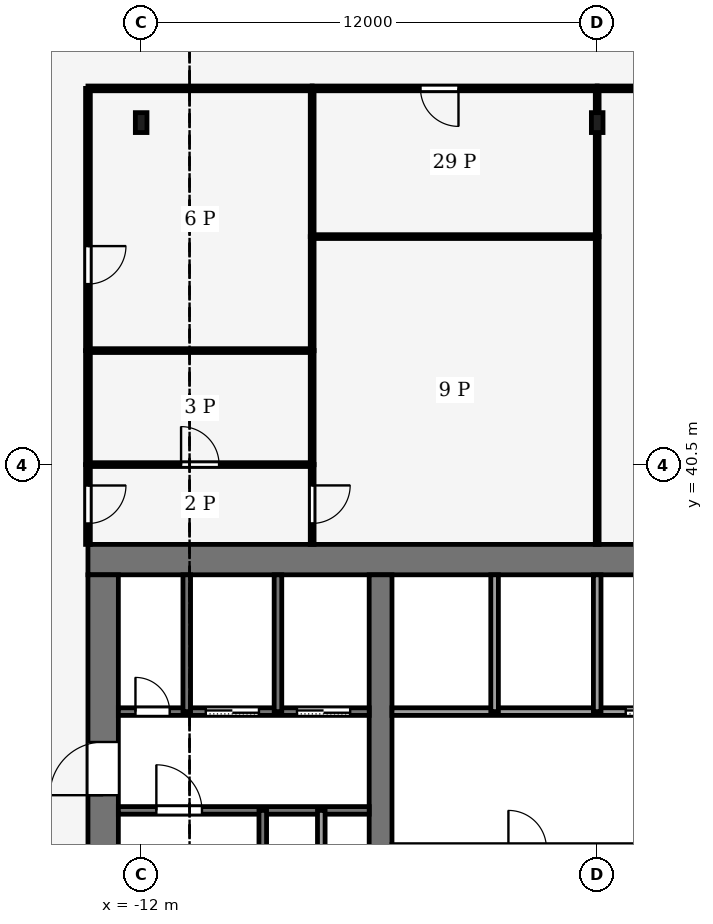
"""IFC4 building model, lengths in metres.
Left out: names, types, materials, properties, quantities, classifications, styles, units other than length and angle.
Written with IfcOpenShell. Run it as: python <this file> out.ifc"""

import sys

from ifc_helpers import new_model, si_unit, direction, frame, frame_2d, origin, origin_2d, place, context, subcontext, project, spatial, rectangle, i_section, extrude, element, fill, save


model = new_model("IFC4")
c1 = context("Model", 3, precision=1e-05, world=origin(), true_north=direction((0.0, 1.0)))
c2 = subcontext(c1, "Body", "Model", "MODEL_VIEW")
j1 = project(units=[si_unit("LENGTHUNIT", "METRE"), si_unit("PLANEANGLEUNIT", "RADIAN")], contexts=[c1])
p1 = place(None, origin())
s1 = spatial("IfcSite", under=j1, at=p1, CompositionType="ELEMENT")
p2 = place(p1, origin())
s2 = spatial("IfcBuilding", under=s1, at=p2, CompositionType="ELEMENT")
p3 = place(p2, frame((0.0, 0.0, 258.0)))
s3 = spatial("IfcBuildingStorey", under=s2, at=p3, CompositionType="ELEMENT", Elevation=258.0)
p4 = place(p3, frame((-13.4, 38.0, -0.13), z_axis=(0.0, 0.0, 1.0), x_axis=(1.0, 0.0, 0.0)))
e1 = element("IfcWall", 1, at=p4, inside=s3, PredefinedType="SHEAR", context=c2, shape_type="SweptSolid", body=[
    extrude(rectangle(XDim=26.8, YDim=0.8, at=frame_2d((13.4, 0.0))), origin(), (0.0, 0.0, 1.0), 4.0),
])
p5 = place(p3, frame((-13.0, 18.4, -0.13), z_axis=(0.0, 0.0, 1.0), x_axis=(0.0, 1.0, 0.0)))
e2 = element("IfcWall", 2, at=p5, inside=s3, PredefinedType="SHEAR", context=c2, shape_type="SweptSolid", body=[
    extrude(rectangle(XDim=19.2, YDim=0.8, at=frame_2d((9.6, 0.0))), origin(), (0.0, 0.0, 1.0), 4.0),
])
p6 = place(p5, frame((2.8, 0.0, 0.13)))
e3 = element("IfcOpeningElement", 3, at=p6, cuts=e2, PredefinedType="OPENING", context=c2, shape_type="SweptSolid", body=[
    extrude(rectangle(XDim=2.4, YDim=2.4, at=frame_2d((1.2, 1.2))), frame((0.0, 0.41, 0.0), z_axis=(0.0, -1.0, 0.0), x_axis=(1.0, 0.0, 0.0)), (0.0, 0.0, 1.0), 0.82),
])
p7 = place(p5, frame((13.4, 0.0, 0.13)))
e4 = element("IfcOpeningElement", 4, at=p7, cuts=e2, PredefinedType="OPENING", context=c2, shape_type="SweptSolid", body=[
    extrude(rectangle(XDim=1.4, YDim=2.2, at=frame_2d((0.7, 1.1))), frame((0.0, 0.41, 0.0), z_axis=(0.0, -1.0, 0.0), x_axis=(1.0, 0.0, 0.0)), (0.0, 0.0, 1.0), 0.82),
])
p8 = place(p3, frame((-5.7, 18.4, -0.13), z_axis=(0.0, 0.0, 1.0), x_axis=(0.0, 1.0, 0.0)))
e5 = element("IfcWall", 5, at=p8, inside=s3, PredefinedType="SHEAR", context=c2, shape_type="SweptSolid", body=[
    extrude(rectangle(XDim=19.2, YDim=0.6, at=frame_2d((9.6, 0.0))), origin(), (0.0, 0.0, 1.0), 4.0),
])
p9 = place(p8, frame((8.35, 0.0, 0.13)))
e6 = element("IfcOpeningElement", 6, at=p9, cuts=e5, PredefinedType="OPENING", context=c2, shape_type="SweptSolid", body=[
    extrude(rectangle(XDim=0.9, YDim=2.1, at=frame_2d((0.45, 1.05))), frame((0.0, 0.31, 0.0), z_axis=(0.0, -1.0, 0.0), x_axis=(1.0, 0.0, 0.0)), (0.0, 0.0, 1.0), 0.62),
])
for number, where, z_axis, x_axis in (
    (7, (-12.0, 49.5, 0.0), (0.0, 0.0, 1.0), (1.0, 0.0, 0.0)),
    (8, (0.0, 49.5, 0.0), (0.0, 0.0, 1.0), (1.0, 0.0, 0.0)),
):
    element("IfcColumn", number, at=place(p3, frame(where, z_axis=z_axis, x_axis=x_axis)), inside=s3, PredefinedType="COLUMN", context=c2, shape_type="SweptSolid", body=[
        extrude(i_section(OverallWidth=0.306, OverallDepth=0.524, WebThickness=0.012, FlangeThickness=0.04, FilletRadius=0.027, at=origin_2d()), origin(), (0.0, 0.0, 1.0), 4.0),
    ])
p10 = place(p3, frame((-12.6, 31.4, 0.0), z_axis=(0.0, 0.0, 1.0), x_axis=(1.0, 0.0, 0.0)))
e9 = element("IfcWall", 9, at=p10, inside=s3, PredefinedType="PARTITIONING", context=c2, shape_type="SweptSolid", body=[
    extrude(rectangle(XDim=6.6, YDim=0.2, at=frame_2d((3.3, 0.0))), origin(), (0.0, 0.0, 1.0), 3.87),
])
p11 = place(p10, frame((1.0, 0.0, 0.0)))
e10 = element("IfcOpeningElement", 10, at=p11, cuts=e9, PredefinedType="OPENING", context=c2, shape_type="SweptSolid", body=[
    extrude(rectangle(XDim=1.2, YDim=2.2, at=frame_2d((0.6, 1.1))), frame((0.0, 0.11, 0.0), z_axis=(0.0, -1.0, 0.0), x_axis=(1.0, 0.0, 0.0)), (0.0, 0.0, 1.0), 0.22),
])
p12 = place(p3, frame((-12.6, 34.0, 0.0), z_axis=(0.0, 0.0, 1.0), x_axis=(1.0, 0.0, 0.0)))
e11 = element("IfcWall", 11, at=p12, inside=s3, PredefinedType="PARTITIONING", context=c2, shape_type="SweptSolid", body=[
    extrude(rectangle(XDim=6.6, YDim=0.2, at=frame_2d((3.3, 0.0))), origin(), (0.0, 0.0, 1.0), 3.87),
])
p13 = place(p12, frame((4.7, 0.0, 0.0)))
e12 = element("IfcOpeningElement", 12, at=p13, cuts=e11, PredefinedType="OPENING", context=c2, shape_type="SweptSolid", body=[
    extrude(rectangle(XDim=1.4, YDim=2.2, at=frame_2d((0.7, 1.1))), frame((0.0, 0.11, 0.0), z_axis=(0.0, -1.0, 0.0), x_axis=(1.0, 0.0, 0.0)), (0.0, 0.0, 1.0), 0.22),
])
p14 = place(p12, frame((2.3, 0.0, 0.0)))
e13 = element("IfcOpeningElement", 13, at=p14, cuts=e11, PredefinedType="OPENING", context=c2, shape_type="SweptSolid", body=[
    extrude(rectangle(XDim=1.4, YDim=2.2, at=frame_2d((0.7, 1.1))), frame((0.0, 0.11, 0.0), z_axis=(0.0, -1.0, 0.0), x_axis=(1.0, 0.0, 0.0)), (0.0, 0.0, 1.0), 0.22),
])
p15 = place(p12, frame((0.45, 0.0, 0.0)))
e14 = element("IfcOpeningElement", 14, at=p15, cuts=e11, PredefinedType="OPENING", context=c2, shape_type="SweptSolid", body=[
    extrude(rectangle(XDim=0.9, YDim=2.1, at=frame_2d((0.45, 1.05))), frame((0.0, 0.11, 0.0), z_axis=(0.0, -1.0, 0.0), x_axis=(1.0, 0.0, 0.0)), (0.0, 0.0, 1.0), 0.22),
])
p16 = place(p3, frame((-5.4, 34.0, 0.0), z_axis=(0.0, 0.0, 1.0), x_axis=(1.0, 0.0, 0.0)))
e15 = element("IfcWall", 15, at=p16, inside=s3, PredefinedType="PARTITIONING", context=c2, shape_type="SweptSolid", body=[
    extrude(rectangle(XDim=10.8, YDim=0.2, at=frame_2d((5.4, 0.0))), origin(), (0.0, 0.0, 1.0), 3.87),
])
p17 = place(p16, frame((6.15, 0.0, 0.0)))
e16 = element("IfcOpeningElement", 16, at=p17, cuts=e15, PredefinedType="OPENING", context=c2, shape_type="SweptSolid", body=[
    extrude(rectangle(XDim=1.2, YDim=2.2, at=frame_2d((0.6, 1.1))), frame((0.0, 0.11, 0.0), z_axis=(0.0, -1.0, 0.0), x_axis=(1.0, 0.0, 0.0)), (0.0, 0.0, 1.0), 0.22),
])
p18 = place(p16, frame((8.95, 0.0, 0.0)))
e17 = element("IfcOpeningElement", 17, at=p18, cuts=e15, PredefinedType="OPENING", context=c2, shape_type="SweptSolid", body=[
    extrude(rectangle(XDim=1.0, YDim=2.1, at=frame_2d((0.5, 1.05))), frame((0.0, 0.11, 0.0), z_axis=(0.0, -1.0, 0.0), x_axis=(1.0, 0.0, 0.0)), (0.0, 0.0, 1.0), 0.22),
])
p19 = place(p3, frame((-10.8, 34.0, 0.0), z_axis=(0.0, 0.0, 1.0), x_axis=(0.0, 1.0, 0.0)))
e18 = element("IfcWall", 18, at=p19, inside=s3, PredefinedType="PARTITIONING", context=c2, shape_type="SweptSolid", body=[
    extrude(rectangle(XDim=3.6, YDim=0.2, at=frame_2d((1.8, 0.0))), origin(), (0.0, 0.0, 1.0), 3.87),
])
p20 = place(p3, frame((-8.8, 24.0, 0.0), z_axis=(0.0, 0.0, 1.0), x_axis=(0.0, 1.0, 0.0)))
e19 = element("IfcWall", 19, at=p20, inside=s3, PredefinedType="PARTITIONING", context=c2, shape_type="SweptSolid", body=[
    extrude(rectangle(XDim=7.4, YDim=0.2, at=frame_2d((3.7, 0.0))), origin(), (0.0, 0.0, 1.0), 3.87),
])
p21 = place(p3, frame((-8.4, 34.0, 0.0), z_axis=(0.0, 0.0, 1.0), x_axis=(0.0, 1.0, 0.0)))
e20 = element("IfcWall", 20, at=p21, inside=s3, PredefinedType="PARTITIONING", context=c2, shape_type="SweptSolid", body=[
    extrude(rectangle(XDim=3.6, YDim=0.2, at=frame_2d((1.8, 0.0))), origin(), (0.0, 0.0, 1.0), 3.87),
])
p22 = place(p3, frame((-7.26, 24.0, 0.0), z_axis=(0.0, 0.0, 1.0), x_axis=(0.0, 1.0, 0.0)))
e21 = element("IfcWall", 21, at=p22, inside=s3, PredefinedType="PARTITIONING", context=c2, shape_type="SweptSolid", body=[
    extrude(rectangle(XDim=7.4, YDim=0.2, at=frame_2d((3.7, 0.0))), origin(), (0.0, 0.0, 1.0), 3.87),
])
for number, where, z_axis, x_axis in (
    (22, (-2.7, 34.0, 0.0), (0.0, 0.0, 1.0), (0.0, 1.0, 0.0)),
    (23, (0.0, 34.0, 0.0), (0.0, 0.0, 1.0), (0.0, 1.0, 0.0)),
):
    element("IfcWall", number, at=place(p3, frame(where, z_axis=z_axis, x_axis=x_axis)), inside=s3, PredefinedType="PARTITIONING", context=c2, shape_type="SweptSolid", body=[
        extrude(rectangle(XDim=3.6, YDim=0.2, at=frame_2d((1.8, 0.0))), origin(), (0.0, 0.0, 1.0), 3.87),
    ])
p23 = place(p3, frame((-13.4, 40.5, 0.0), z_axis=(0.0, 0.0, 1.0), x_axis=(0.0, -1.0, 0.0)))
e24 = element("IfcWall", 24, at=p23, inside=s3, PredefinedType="PARTITIONING", context=c2, shape_type="SweptSolid", body=[
    extrude(rectangle(XDim=2.1, YDim=0.125, at=frame_2d((1.05, 0.0))), origin(), (0.0, 0.0, 1.0), 3.14),
])
p24 = place(p23, frame((0.55, 0.0, 0.0)))
e25 = element("IfcOpeningElement", 25, at=p24, cuts=e24, PredefinedType="OPENING", context=c2, shape_type="SweptSolid", body=[
    extrude(rectangle(XDim=1.0, YDim=2.1, at=frame_2d((0.5, 1.05))), frame((0.0, 0.073, 0.0), z_axis=(0.0, -1.0, 0.0), x_axis=(1.0, 0.0, 0.0)), (0.0, 0.0, 1.0), 0.145),
])
p25 = place(p3, frame((-13.4, 40.5, 0.0), z_axis=(0.0, 0.0, 1.0), x_axis=(0.0, 1.0, 0.0)))
e26 = element("IfcWall", 26, at=p25, inside=s3, PredefinedType="PARTITIONING", context=c2, shape_type="SweptSolid", body=[
    extrude(rectangle(XDim=3.0, YDim=0.125, at=frame_2d((1.5, 0.0))), origin(), (0.0, 0.0, 1.0), 3.87),
])
p26 = place(p3, frame((-13.4, 50.4, 0.0), z_axis=(0.0, 0.0, 1.0), x_axis=(0.0, -1.0, 0.0)))
e27 = element("IfcWall", 27, at=p26, inside=s3, PredefinedType="PARTITIONING", context=c2, shape_type="SweptSolid", body=[
    extrude(rectangle(XDim=6.9, YDim=0.125, at=frame_2d((3.45, 0.0))), origin(), (0.0, 0.0, 1.0), 3.24),
])
p27 = place(p26, frame((4.15, 0.0, 0.0)))
e28 = element("IfcOpeningElement", 28, at=p27, cuts=e27, PredefinedType="OPENING", context=c2, shape_type="SweptSolid", body=[
    extrude(rectangle(XDim=1.0, YDim=2.1, at=frame_2d((0.5, 1.05))), frame((0.0, 0.073, 0.0), z_axis=(0.0, -1.0, 0.0), x_axis=(1.0, 0.0, 0.0)), (0.0, 0.0, 1.0), 0.145),
])
p28 = place(p3, frame((-7.5, 50.4, 0.0), z_axis=(0.0, 0.0, 1.0), x_axis=(-1.0, 0.0, 0.0)))
e29 = element("IfcWall", 29, at=p28, inside=s3, PredefinedType="PARTITIONING", context=c2, shape_type="SweptSolid", body=[
    extrude(rectangle(XDim=5.9, YDim=0.125, at=frame_2d((2.95, 0.0))), origin(), (0.0, 0.0, 1.0), 3.24),
])
p29 = place(p3, frame((0.0, 50.4, 0.0), z_axis=(0.0, 0.0, 1.0), x_axis=(-1.0, 0.0, 0.0)))
e30 = element("IfcWall", 30, at=p29, inside=s3, PredefinedType="PARTITIONING", context=c2, shape_type="SweptSolid", body=[
    extrude(rectangle(XDim=7.5, YDim=0.125, at=frame_2d((3.75, 0.0))), origin(), (0.0, 0.0, 1.0), 3.24),
])
p30 = place(p29, frame((3.65, 0.0, 0.0)))
e31 = element("IfcOpeningElement", 31, at=p30, cuts=e30, PredefinedType="OPENING", context=c2, shape_type="SweptSolid", body=[
    extrude(rectangle(XDim=1.0, YDim=2.1, at=frame_2d((0.5, 1.05))), frame((0.0, 0.073, 0.0), z_axis=(0.0, -1.0, 0.0), x_axis=(1.0, 0.0, 0.0)), (0.0, 0.0, 1.0), 0.145),
])
p31 = place(p3, frame((7.5, 50.4, 0.0), z_axis=(0.0, 0.0, 1.0), x_axis=(-1.0, 0.0, 0.0)))
e32 = element("IfcWall", 32, at=p31, inside=s3, PredefinedType="PARTITIONING", context=c2, shape_type="SweptSolid", body=[
    extrude(rectangle(XDim=7.5, YDim=0.125, at=frame_2d((3.75, 0.0))), origin(), (0.0, 0.0, 1.0), 3.24),
])
p32 = place(p31, frame((2.85, 0.0, 0.0)))
e33 = element("IfcOpeningElement", 33, at=p32, cuts=e32, PredefinedType="OPENING", context=c2, shape_type="SweptSolid", body=[
    extrude(rectangle(XDim=1.0, YDim=2.1, at=frame_2d((0.5, 1.05))), frame((0.0, 0.073, 0.0), z_axis=(0.0, -1.0, 0.0), x_axis=(1.0, 0.0, 0.0)), (0.0, 0.0, 1.0), 0.145),
])
p33 = place(p3, frame((-13.4, 40.5, 0.0), z_axis=(0.0, 0.0, 1.0), x_axis=(1.0, 0.0, 0.0)))
e34 = element("IfcWall", 34, at=p33, inside=s3, PredefinedType="PARTITIONING", context=c2, shape_type="SweptSolid", body=[
    extrude(rectangle(XDim=5.9, YDim=0.1, at=frame_2d((2.95, 0.0))), origin(), (0.0, 0.0, 1.0), 3.44),
])
p34 = place(p33, frame((2.45, 0.0, 0.0)))
e35 = element("IfcOpeningElement", 35, at=p34, cuts=e34, PredefinedType="OPENING", context=c2, shape_type="SweptSolid", body=[
    extrude(rectangle(XDim=1.0, YDim=2.1, at=frame_2d((0.5, 1.05))), frame((0.0, 0.06, 0.0), z_axis=(0.0, -1.0, 0.0), x_axis=(1.0, 0.0, 0.0)), (0.0, 0.0, 1.0), 0.12),
])
p35 = place(p3, frame((-7.5, 40.504, 0.0), z_axis=(0.0, 0.0, 1.0), x_axis=(0.0, -1.0, 0.0)))
e36 = element("IfcWall", 36, at=p35, inside=s3, PredefinedType="PARTITIONING", context=c2, shape_type="SweptSolid", body=[
    extrude(rectangle(XDim=2.104, YDim=0.1, at=frame_2d((1.052, 0.0))), origin(), (0.0, 0.0, 1.0), 3.87),
])
p36 = place(p35, frame((0.552, 0.0, 0.0)))
e37 = element("IfcOpeningElement", 37, at=p36, cuts=e36, PredefinedType="OPENING", context=c2, shape_type="SweptSolid", body=[
    extrude(rectangle(XDim=1.0, YDim=2.1, at=frame_2d((0.5, 1.05))), frame((0.0, 0.06, 0.0), z_axis=(0.0, -1.0, 0.0), x_axis=(1.0, 0.0, 0.0)), (0.0, 0.0, 1.0), 0.12),
])
p37 = place(p3, frame((-7.5, 43.5, 0.0), z_axis=(0.0, 0.0, 1.0), x_axis=(-1.0, 0.0, 0.0)))
e38 = element("IfcWall", 38, at=p37, inside=s3, PredefinedType="PARTITIONING", context=c2, shape_type="SweptSolid", body=[
    extrude(rectangle(XDim=5.9, YDim=0.1, at=frame_2d((2.95, 0.0))), origin(), (0.0, 0.0, 1.0), 3.44),
])
p38 = place(p3, frame((-7.5, 40.496, 0.0), z_axis=(0.0, 0.0, 1.0), x_axis=(0.0, 1.0, 0.0)))
e39 = element("IfcWall", 39, at=p38, inside=s3, PredefinedType="PARTITIONING", context=c2, shape_type="SweptSolid", body=[
    extrude(rectangle(XDim=3.008, YDim=0.1, at=frame_2d((1.504, 0.0))), origin(), (0.0, 0.0, 1.0), 3.87),
])
p39 = place(p3, frame((-7.5, 43.496, 0.0), z_axis=(0.0, 0.0, 1.0), x_axis=(0.0, 1.0, 0.0)))
e40 = element("IfcWall", 40, at=p39, inside=s3, PredefinedType="PARTITIONING", context=c2, shape_type="SweptSolid", body=[
    extrude(rectangle(XDim=3.004, YDim=0.1, at=frame_2d((1.502, 0.0))), origin(), (0.0, 0.0, 1.0), 3.87),
])
p40 = place(p3, frame((-7.5, 46.5, 0.0), z_axis=(0.0, 0.0, 1.0), x_axis=(0.0, 1.0, 0.0)))
e41 = element("IfcWall", 41, at=p40, inside=s3, PredefinedType="PARTITIONING", context=c2, shape_type="SweptSolid", body=[
    extrude(rectangle(XDim=3.9, YDim=0.1, at=frame_2d((1.95, 0.0))), origin(), (0.0, 0.0, 1.0), 3.24),
])
p41 = place(p3, frame((0.0, 46.5, 0.0), z_axis=(0.0, 0.0, 1.0), x_axis=(-1.0, 0.0, 0.0)))
e42 = element("IfcWall", 42, at=p41, inside=s3, PredefinedType="PARTITIONING", context=c2, shape_type="SweptSolid", body=[
    extrude(rectangle(XDim=7.5, YDim=0.1, at=frame_2d((3.75, 0.0))), origin(), (0.0, 0.0, 1.0), 3.44),
])
p42 = place(p3, frame((0.0, 38.4, 0.0), z_axis=(0.0, 0.0, 1.0), x_axis=(0.0, 1.0, 0.0)))
e43 = element("IfcWall", 43, at=p42, inside=s3, PredefinedType="PARTITIONING", context=c2, shape_type="SweptSolid", body=[
    extrude(rectangle(XDim=8.104, YDim=0.1, at=frame_2d((4.052, 0.0))), origin(), (0.0, 0.0, 1.0), 3.44),
])
p43 = place(p3, frame((0.0, 46.496, 0.0), z_axis=(0.0, 0.0, 1.0), x_axis=(0.0, 1.0, 0.0)))
e44 = element("IfcWall", 44, at=p43, inside=s3, PredefinedType="PARTITIONING", context=c2, shape_type="SweptSolid", body=[
    extrude(rectangle(XDim=3.904, YDim=0.1, at=frame_2d((1.952, 0.0))), origin(), (0.0, 0.0, 1.0), 3.29),
])
p44 = place(p17, origin())
e45 = element("IfcDoor", 45, at=p44, inside=s3, OperationType="SLIDING_TO_LEFT", PredefinedType="DOOR", context=c2, shape_type="SweptSolid", body=[
    extrude(rectangle(XDim=1.2, YDim=2.2, at=frame_2d((0.6, 1.1))), frame((0.0, 0.025, 0.0), z_axis=(0.0, -1.0, 0.0), x_axis=(1.0, 0.0, 0.0)), (0.0, 0.0, 1.0), 0.05),
])
fill(e16, e45)
p45 = place(p13, origin())
e46 = element("IfcDoor", 46, at=p45, inside=s3, OperationType="SLIDING_TO_LEFT", PredefinedType="DOOR", context=c2, shape_type="SweptSolid", body=[
    extrude(rectangle(XDim=1.4, YDim=2.2, at=frame_2d((0.7, 1.1))), frame((0.0, 0.025, 0.0), z_axis=(0.0, -1.0, 0.0), x_axis=(1.0, 0.0, 0.0)), (0.0, 0.0, 1.0), 0.05),
])
fill(e12, e46)
p46 = place(p14, origin())
e47 = element("IfcDoor", 47, at=p46, inside=s3, OperationType="SLIDING_TO_LEFT", PredefinedType="DOOR", context=c2, shape_type="SweptSolid", body=[
    extrude(rectangle(XDim=1.4, YDim=2.2, at=frame_2d((0.7, 1.1))), frame((0.0, 0.025, 0.0), z_axis=(0.0, -1.0, 0.0), x_axis=(1.0, 0.0, 0.0)), (0.0, 0.0, 1.0), 0.05),
])
fill(e13, e47)
p47 = place(p15, origin())
e48 = element("IfcDoor", 48, at=p47, inside=s3, OperationType="SINGLE_SWING_RIGHT", PredefinedType="DOOR", context=c2, shape_type="SweptSolid", body=[
    extrude(rectangle(XDim=0.9, YDim=2.1, at=frame_2d((0.45, 1.05))), frame((0.0, 0.025, 0.0), z_axis=(0.0, -1.0, 0.0), x_axis=(1.0, 0.0, 0.0)), (0.0, 0.0, 1.0), 0.05),
])
fill(e14, e48)
p48 = place(p11, origin())
e49 = element("IfcDoor", 49, at=p48, inside=s3, OperationType="SINGLE_SWING_RIGHT", PredefinedType="DOOR", context=c2, shape_type="SweptSolid", body=[
    extrude(rectangle(XDim=1.2, YDim=2.2, at=frame_2d((0.6, 1.1))), frame((0.0, 0.025, 0.0), z_axis=(0.0, -1.0, 0.0), x_axis=(1.0, 0.0, 0.0)), (0.0, 0.0, 1.0), 0.05),
])
fill(e10, e49)
p49 = place(p7, origin())
e50 = element("IfcDoor", 50, at=p49, inside=s3, OperationType="SINGLE_SWING_RIGHT", PredefinedType="DOOR", context=c2, shape_type="SweptSolid", body=[
    extrude(rectangle(XDim=1.4, YDim=2.2, at=frame_2d((0.7, 1.1))), frame((0.0, 0.025, 0.0), z_axis=(0.0, -1.0, 0.0), x_axis=(1.0, 0.0, 0.0)), (0.0, 0.0, 1.0), 0.05),
])
fill(e4, e50)
p50 = place(p24, origin())
e51 = element("IfcDoor", 51, at=p50, inside=s3, OperationType="SINGLE_SWING_RIGHT", PredefinedType="DOOR", context=c2, shape_type="SweptSolid", body=[
    extrude(rectangle(XDim=1.0, YDim=2.1, at=frame_2d((0.5, 1.05))), frame((0.0, 0.025, 0.0), z_axis=(0.0, -1.0, 0.0), x_axis=(1.0, 0.0, 0.0)), (0.0, 0.0, 1.0), 0.05),
])
fill(e25, e51)
p51 = place(p27, origin())
e52 = element("IfcDoor", 52, at=p51, inside=s3, OperationType="SINGLE_SWING_RIGHT", PredefinedType="DOOR", context=c2, shape_type="SweptSolid", body=[
    extrude(rectangle(XDim=1.0, YDim=2.1, at=frame_2d((0.5, 1.05))), frame((0.0, 0.025, 0.0), z_axis=(0.0, -1.0, 0.0), x_axis=(1.0, 0.0, 0.0)), (0.0, 0.0, 1.0), 0.05),
])
fill(e28, e52)
p52 = place(p30, origin())
e53 = element("IfcDoor", 53, at=p52, inside=s3, OperationType="SINGLE_SWING_RIGHT", PredefinedType="DOOR", context=c2, shape_type="SweptSolid", body=[
    extrude(rectangle(XDim=1.0, YDim=2.1, at=frame_2d((0.5, 1.05))), frame((0.0, 0.025, 0.0), z_axis=(0.0, -1.0, 0.0), x_axis=(1.0, 0.0, 0.0)), (0.0, 0.0, 1.0), 0.05),
])
fill(e31, e53)
p53 = place(p34, origin())
e54 = element("IfcDoor", 54, at=p53, inside=s3, OperationType="SINGLE_SWING_LEFT", PredefinedType="DOOR", context=c2, shape_type="SweptSolid", body=[
    extrude(rectangle(XDim=1.0, YDim=2.1, at=frame_2d((0.5, 1.05))), frame((0.0, 0.025, 0.0), z_axis=(0.0, -1.0, 0.0), x_axis=(1.0, 0.0, 0.0)), (0.0, 0.0, 1.0), 0.05),
])
fill(e35, e54)
p54 = place(p36, origin())
e55 = element("IfcDoor", 55, at=p54, inside=s3, OperationType="SINGLE_SWING_RIGHT", PredefinedType="DOOR", context=c2, shape_type="SweptSolid", body=[
    extrude(rectangle(XDim=1.0, YDim=2.1, at=frame_2d((0.5, 1.05))), frame((0.0, 0.025, 0.0), z_axis=(0.0, -1.0, 0.0), x_axis=(1.0, 0.0, 0.0)), (0.0, 0.0, 1.0), 0.05),
])
fill(e37, e55)
save(model, sys.argv[1])
